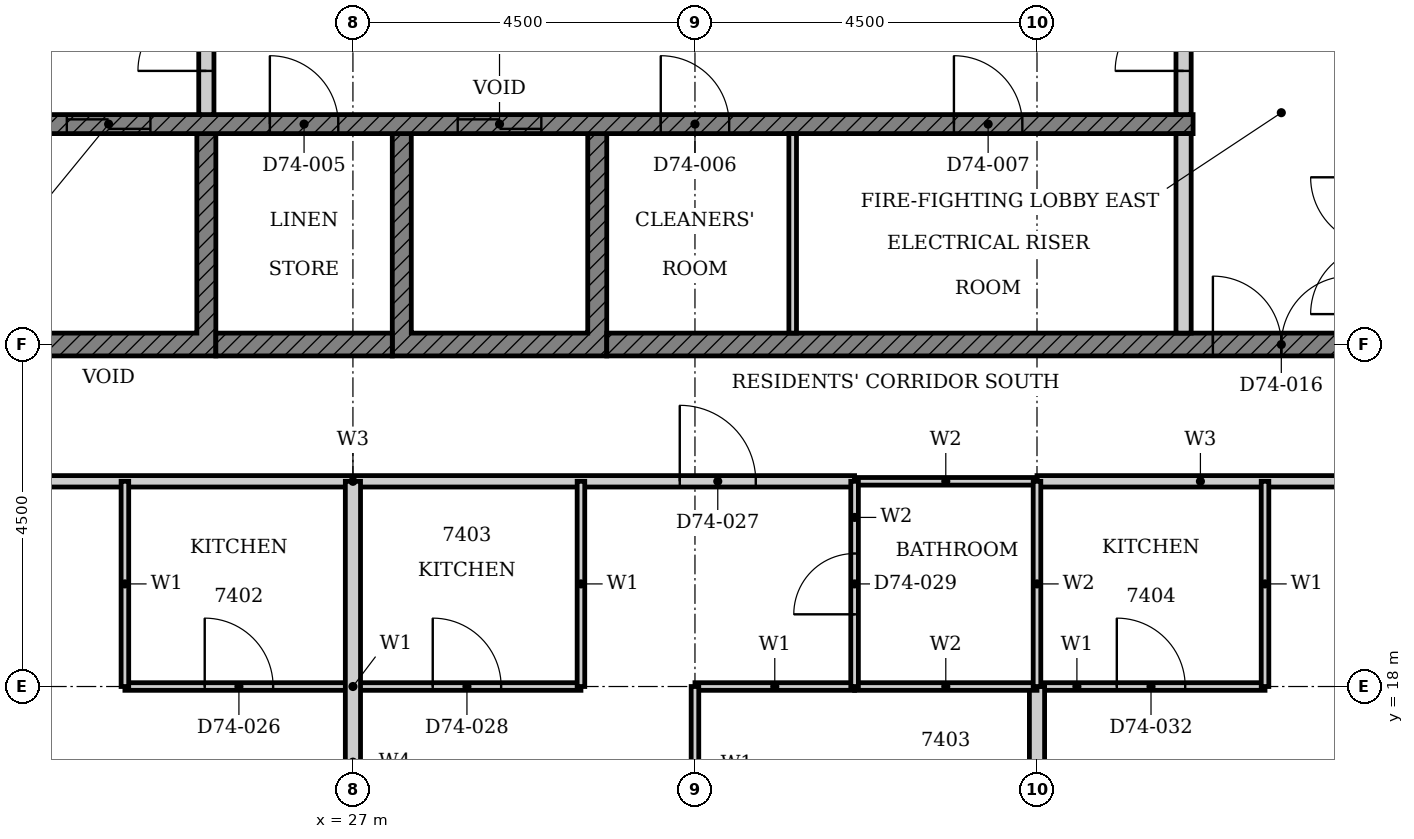
"""IFC4 building model, lengths in metres.
Left out: names, types, materials, properties, quantities, classifications, styles, units other than length and angle.
Written with IfcOpenShell. Run it as: python <this file> out.ifc"""

import sys

from ifc_helpers import new_model, si_unit, direction, frame, frame_2d, origin, place, context, subcontext, project, spatial, polyline, rectangle, outline, extrude, element, fill, save


model = new_model("IFC4")
c1 = context("Model", 3, precision=1e-05, world=origin(), true_north=direction((0.0, 1.0)))
c2 = subcontext(c1, "Body", "Model", "MODEL_VIEW")
j1 = project(units=[si_unit("LENGTHUNIT", "METRE"), si_unit("PLANEANGLEUNIT", "RADIAN")], contexts=[c1])
p1 = place(None, origin())
s1 = spatial("IfcSite", under=j1, at=p1, CompositionType="ELEMENT")
p2 = place(p1, origin())
s2 = spatial("IfcBuilding", under=s1, at=p2, CompositionType="ELEMENT")
p3 = place(p2, frame((0.0, 0.0, 290.8)))
s3 = spatial("IfcBuildingStorey", under=s2, at=p3, CompositionType="ELEMENT", Elevation=290.8)
p4 = place(p3, origin())
e1 = element("IfcWall", 1, at=p4, inside=s3, PredefinedType="SHEAR", context=c2, shape_type="SweptSolid", body=[
    extrude(outline(polyline([(22.375, 22.35), (25.197, 22.35), (25.197, 25.275), (24.947, 25.275), (24.947, 22.65), (22.625, 22.65), (22.625, 25.275), (22.375, 25.275), (22.375, 22.35)])), origin(), (0.0, 0.0, 1.0), 3.4),
])
p5 = place(p3, origin())
e2 = element("IfcWall", 2, at=p5, inside=s3, PredefinedType="SHEAR", context=c2, shape_type="SweptSolid", body=[
    extrude(outline(polyline([(27.518, 22.35), (30.339, 22.35), (30.339, 25.275), (30.089, 25.275), (30.089, 22.65), (27.768, 22.65), (27.768, 25.275), (27.518, 25.275), (27.518, 22.35)])), origin(), (0.0, 0.0, 1.0), 3.4),
])
p6 = place(p3, frame((25.197, 22.5, 0.0), z_axis=(0.0, 0.0, 1.0), x_axis=(1.0, 0.0, 0.0)))
e3 = element("IfcWall", 3, at=p6, inside=s3, PredefinedType="SHEAR", context=c2, shape_type="SweptSolid", body=[
    extrude(rectangle(XDim=2.321, YDim=0.3, at=frame_2d((1.161, 0.0))), origin(), (0.0, 0.0, 1.0), 3.4),
])
p7 = place(p3, frame((30.339, 22.5, 0.0), z_axis=(0.0, 0.0, 1.0), x_axis=(1.0, 0.0, 0.0)))
e4 = element("IfcWall", 4, at=p7, inside=s3, PredefinedType="SHEAR", context=c2, shape_type="SweptSolid", body=[
    extrude(rectangle(XDim=14.511, YDim=0.3, at=frame_2d((7.255, 0.0))), origin(), (0.0, 0.0, 1.0), 3.4),
])
p8 = place(p7, frame((7.975, 0.0, 0.0)))
e5 = element("IfcOpeningElement", 5, at=p8, cuts=e4, PredefinedType="OPENING", context=c2, shape_type="SweptSolid", body=[
    extrude(rectangle(XDim=1.8, YDim=2.1, at=frame_2d((0.9, 1.05))), frame((0.0, 0.16, 0.0), z_axis=(0.0, -1.0, 0.0), x_axis=(1.0, 0.0, 0.0)), (0.0, 0.0, 1.0), 0.32),
])
p9 = place(p3, frame((22.375, 25.4, 0.0), z_axis=(0.0, 0.0, 1.0), x_axis=(1.0, 0.0, 0.0)))
e6 = element("IfcWall", 6, at=p9, inside=s3, PredefinedType="SHEAR", context=c2, shape_type="SweptSolid", body=[
    extrude(rectangle(XDim=15.678, YDim=0.25, at=frame_2d((7.839, 0.0))), origin(), (0.0, 0.0, 1.0), 3.4),
])
p10 = place(p9, frame((6.004, 0.0, 0.0)))
e7 = element("IfcOpeningElement", 7, at=p10, cuts=e6, PredefinedType="OPENING", context=c2, shape_type="SweptSolid", body=[
    extrude(rectangle(XDim=1.1, YDim=2.1, at=frame_2d((0.55, 1.05))), frame((0.0, 0.135, 0.0), z_axis=(0.0, -1.0, 0.0), x_axis=(1.0, 0.0, 0.0)), (0.0, 0.0, 1.0), 0.27),
])
p11 = place(p9, frame((0.861, 0.0, 0.0)))
e8 = element("IfcOpeningElement", 8, at=p11, cuts=e6, PredefinedType="OPENING", context=c2, shape_type="SweptSolid", body=[
    extrude(rectangle(XDim=1.1, YDim=2.1, at=frame_2d((0.55, 1.05))), frame((0.0, 0.135, 0.0), z_axis=(0.0, -1.0, 0.0), x_axis=(1.0, 0.0, 0.0)), (0.0, 0.0, 1.0), 0.27),
])
p12 = place(p9, frame((3.532, 0.0, 0.0)))
e9 = element("IfcOpeningElement", 9, at=p12, cuts=e6, PredefinedType="OPENING", context=c2, shape_type="SweptSolid", body=[
    extrude(rectangle(XDim=0.9, YDim=2.1, at=frame_2d((0.45, 1.05))), frame((0.0, 0.135, 0.0), z_axis=(0.0, -1.0, 0.0), x_axis=(1.0, 0.0, 0.0)), (0.0, 0.0, 1.0), 0.27),
])
p13 = place(p9, frame((8.675, 0.0, 0.0)))
e10 = element("IfcOpeningElement", 10, at=p13, cuts=e6, PredefinedType="OPENING", context=c2, shape_type="SweptSolid", body=[
    extrude(rectangle(XDim=0.9, YDim=2.1, at=frame_2d((0.45, 1.05))), frame((0.0, 0.135, 0.0), z_axis=(0.0, -1.0, 0.0), x_axis=(1.0, 0.0, 0.0)), (0.0, 0.0, 1.0), 0.27),
])
p14 = place(p9, frame((12.532, 0.0, 0.0)))
e11 = element("IfcOpeningElement", 11, at=p14, cuts=e6, PredefinedType="OPENING", context=c2, shape_type="SweptSolid", body=[
    extrude(rectangle(XDim=0.9, YDim=2.1, at=frame_2d((0.45, 1.05))), frame((0.0, 0.135, 0.0), z_axis=(0.0, -1.0, 0.0), x_axis=(1.0, 0.0, 0.0)), (0.0, 0.0, 1.0), 0.27),
])
p15 = place(p3, frame((37.928, 22.65, 0.0), z_axis=(0.0, 0.0, 1.0), x_axis=(0.0, 1.0, 0.0)))
e12 = element("IfcWall", 12, at=p15, inside=s3, PredefinedType="PARTITIONING", context=c2, shape_type="SweptSolid", body=[
    extrude(rectangle(XDim=2.625, YDim=0.2, at=frame_2d((1.312, 0.0))), origin(), (0.0, 0.0, 1.0), 3.4),
])
p16 = place(p3, frame((32.786, 22.65, 0.0), z_axis=(0.0, 0.0, 1.0), x_axis=(0.0, 1.0, 0.0)))
e13 = element("IfcWall", 13, at=p16, inside=s3, PredefinedType="PARTITIONING", context=c2, shape_type="SweptSolid", body=[
    extrude(rectangle(XDim=2.625, YDim=0.1, at=frame_2d((1.312, 0.0))), origin(), (0.0, 0.0, 1.0), 3.4),
])
p17 = place(p3, frame((25.072, 25.525, 0.0), z_axis=(0.0, 0.0, 1.0), x_axis=(0.0, 1.0, 0.0)))
e14 = element("IfcWall", 14, at=p17, inside=s3, PredefinedType="PARTITIONING", context=c2, shape_type="SweptSolid", body=[
    extrude(rectangle(XDim=2.95, YDim=0.2, at=frame_2d((1.475, 0.0))), origin(), (0.0, 0.0, 1.0), 3.4),
])
p18 = place(p17, frame((0.575, 0.0, 0.0)))
e15 = element("IfcOpeningElement", 15, at=p18, cuts=e14, PredefinedType="OPENING", context=c2, shape_type="SweptSolid", body=[
    extrude(rectangle(XDim=1.8, YDim=2.1, at=frame_2d((0.9, 1.05))), frame((0.0, 0.11, 0.0), z_axis=(0.0, -1.0, 0.0), x_axis=(1.0, 0.0, 0.0)), (0.0, 0.0, 1.0), 0.22),
])
p19 = place(p3, frame((37.928, 25.525, 0.0), z_axis=(0.0, 0.0, 1.0), x_axis=(0.0, 1.0, 0.0)))
e16 = element("IfcWall", 16, at=p19, inside=s3, PredefinedType="PARTITIONING", context=c2, shape_type="SweptSolid", body=[
    extrude(rectangle(XDim=2.95, YDim=0.2, at=frame_2d((1.475, 0.0))), origin(), (0.0, 0.0, 1.0), 3.4),
])
p20 = place(p19, frame((0.575, 0.0, 0.0)))
e17 = element("IfcOpeningElement", 17, at=p20, cuts=e16, PredefinedType="OPENING", context=c2, shape_type="SweptSolid", body=[
    extrude(rectangle(XDim=1.8, YDim=2.1, at=frame_2d((0.9, 1.05))), frame((0.0, 0.11, 0.0), z_axis=(0.0, -1.0, 0.0), x_axis=(1.0, 0.0, 0.0)), (0.0, 0.0, 1.0), 0.22),
])
p21 = place(p3, frame((20.4, 20.7, 0.0), z_axis=(0.0, 0.0, 1.0), x_axis=(1.0, 0.0, 0.0)))
e18 = element("IfcWall", 18, at=p21, inside=s3, PredefinedType="PARTITIONING", context=c2, shape_type="SweptSolid", body=[
    extrude(rectangle(XDim=13.2, YDim=0.15, at=frame_2d((6.6, 0.0))), origin(), (0.0, 0.0, 1.0), 3.4),
])
p22 = place(p21, frame((1.3, 0.0, 0.0)))
e19 = element("IfcOpeningElement", 19, at=p22, cuts=e18, PredefinedType="OPENING", context=c2, shape_type="SweptSolid", body=[
    extrude(rectangle(XDim=1.0, YDim=2.2, at=frame_2d((0.5, 1.1))), frame((0.0, 0.085, 0.0), z_axis=(0.0, -1.0, 0.0), x_axis=(1.0, 0.0, 0.0)), (0.0, 0.0, 1.0), 0.17),
])
p23 = place(p21, frame((10.9, 0.0, 0.0)))
e20 = element("IfcOpeningElement", 20, at=p23, cuts=e18, PredefinedType="OPENING", context=c2, shape_type="SweptSolid", body=[
    extrude(rectangle(XDim=1.0, YDim=2.2, at=frame_2d((0.5, 1.1))), frame((0.0, 0.085, 0.0), z_axis=(0.0, -1.0, 0.0), x_axis=(1.0, 0.0, 0.0)), (0.0, 0.0, 1.0), 0.17),
])
p24 = place(p3, frame((36.0, 20.7, 0.0), z_axis=(0.0, 0.0, 1.0), x_axis=(1.0, 0.0, 0.0)))
e21 = element("IfcWall", 21, at=p24, inside=s3, PredefinedType="PARTITIONING", context=c2, shape_type="SweptSolid", body=[
    extrude(rectangle(XDim=6.6, YDim=0.15, at=frame_2d((3.3, 0.0))), origin(), (0.0, 0.0, 1.0), 3.4),
])
p25 = place(p24, frame((4.3, 0.0, 0.0)))
e22 = element("IfcOpeningElement", 22, at=p25, cuts=e21, PredefinedType="OPENING", context=c2, shape_type="SweptSolid", body=[
    extrude(rectangle(XDim=1.0, YDim=2.2, at=frame_2d((0.5, 1.1))), frame((0.0, 0.085, 0.0), z_axis=(0.0, -1.0, 0.0), x_axis=(1.0, 0.0, 0.0)), (0.0, 0.0, 1.0), 0.17),
])
p26 = place(p3, frame((24.0, 18.0, 0.0), z_axis=(0.0, 0.0, 1.0), x_axis=(1.0, 0.0, 0.0)))
e23 = element("IfcWall", 23, at=p26, inside=s3, PredefinedType="PARTITIONING", context=c2, shape_type="SweptSolid", body=[
    extrude(rectangle(XDim=6.0, YDim=0.1, at=frame_2d((3.0, 0.0))), origin(), (0.0, 0.0, 1.0), 3.4),
])
p27 = place(p26, frame((1.05, 0.0, 0.0)))
e24 = element("IfcOpeningElement", 24, at=p27, cuts=e23, PredefinedType="OPENING", context=c2, shape_type="SweptSolid", body=[
    extrude(rectangle(XDim=0.9, YDim=2.1, at=frame_2d((0.45, 1.05))), frame((0.0, 0.06, 0.0), z_axis=(0.0, -1.0, 0.0), x_axis=(1.0, 0.0, 0.0)), (0.0, 0.0, 1.0), 0.12),
])
p28 = place(p26, frame((4.05, 0.0, 0.0)))
e25 = element("IfcOpeningElement", 25, at=p28, cuts=e23, PredefinedType="OPENING", context=c2, shape_type="SweptSolid", body=[
    extrude(rectangle(XDim=0.9, YDim=2.1, at=frame_2d((0.45, 1.05))), frame((0.0, 0.06, 0.0), z_axis=(0.0, -1.0, 0.0), x_axis=(1.0, 0.0, 0.0)), (0.0, 0.0, 1.0), 0.12),
])
p29 = place(p3, frame((31.5, 18.0, 0.0), z_axis=(0.0, 0.0, 1.0), x_axis=(1.0, 0.0, 0.0)))
e26 = element("IfcWall", 26, at=p29, inside=s3, PredefinedType="PARTITIONING", context=c2, shape_type="SweptSolid", body=[
    extrude(rectangle(XDim=2.1, YDim=0.1, at=frame_2d((1.05, 0.0))), origin(), (0.0, 0.0, 1.0), 3.4),
])
p30 = place(p3, frame((36.0, 18.0, 0.0), z_axis=(0.0, 0.0, 1.0), x_axis=(1.0, 0.0, 0.0)))
e27 = element("IfcWall", 27, at=p30, inside=s3, PredefinedType="PARTITIONING", context=c2, shape_type="SweptSolid", body=[
    extrude(rectangle(XDim=3.0, YDim=0.1, at=frame_2d((1.5, 0.0))), origin(), (0.0, 0.0, 1.0), 3.4),
])
p31 = place(p30, frame((1.05, 0.0, 0.0)))
e28 = element("IfcOpeningElement", 28, at=p31, cuts=e27, PredefinedType="OPENING", context=c2, shape_type="SweptSolid", body=[
    extrude(rectangle(XDim=0.9, YDim=2.1, at=frame_2d((0.45, 1.05))), frame((0.0, 0.06, 0.0), z_axis=(0.0, -1.0, 0.0), x_axis=(1.0, 0.0, 0.0)), (0.0, 0.0, 1.0), 0.12),
])
for number, where, z_axis, x_axis in (
    (29, (24.0, 18.0, 0.0), (0.0, 0.0, 1.0), (0.0, 1.0, 0.0)),
    (30, (30.0, 18.0, 0.0), (0.0, 0.0, 1.0), (0.0, 1.0, 0.0)),
):
    element("IfcWall", number, at=place(p3, frame(where, z_axis=z_axis, x_axis=x_axis)), inside=s3, PredefinedType="PARTITIONING", context=c2, shape_type="SweptSolid", body=[
        extrude(rectangle(XDim=2.7, YDim=0.1, at=frame_2d((1.35, 0.0))), origin(), (0.0, 0.0, 1.0), 3.4),
    ])
p32 = place(p3, frame((31.5, 13.26, 0.0), z_axis=(0.0, 0.0, 1.0), x_axis=(0.0, 1.0, 0.0)))
e31 = element("IfcWall", 31, at=p32, inside=s3, PredefinedType="PARTITIONING", context=c2, shape_type="SweptSolid", body=[
    extrude(rectangle(XDim=4.74, YDim=0.1, at=frame_2d((2.37, 0.0))), origin(), (0.0, 0.0, 1.0), 3.4),
])
p33 = place(p32, frame((1.8, 0.0, 0.0)))
e32 = element("IfcOpeningElement", 32, at=p33, cuts=e31, PredefinedType="OPENING", context=c2, shape_type="SweptSolid", body=[
    extrude(rectangle(XDim=0.9, YDim=2.1, at=frame_2d((0.45, 1.05))), frame((0.0, 0.06, 0.0), z_axis=(0.0, -1.0, 0.0), x_axis=(1.0, 0.0, 0.0)), (0.0, 0.0, 1.0), 0.12),
])
p34 = place(p3, frame((39.0, 18.0, 0.0), z_axis=(0.0, 0.0, 1.0), x_axis=(0.0, 1.0, 0.0)))
e33 = element("IfcWall", 33, at=p34, inside=s3, PredefinedType="PARTITIONING", context=c2, shape_type="SweptSolid", body=[
    extrude(rectangle(XDim=2.7, YDim=0.1, at=frame_2d((1.35, 0.0))), origin(), (0.0, 0.0, 1.0), 3.4),
])
p35 = place(p3, frame((27.0, 13.31, 0.0), z_axis=(0.0, 0.0, 1.0), x_axis=(0.0, 1.0, 0.0)))
e34 = element("IfcWall", 34, at=p35, inside=s3, PredefinedType="PARTITIONING", context=c2, shape_type="SweptSolid", body=[
    extrude(rectangle(XDim=7.39, YDim=0.2, at=frame_2d((3.695, 0.0))), origin(), (0.0, 0.0, 1.0), 3.4),
])
p36 = place(p3, frame((36.0, 13.31, 0.0), z_axis=(0.0, 0.0, 1.0), x_axis=(0.0, 1.0, 0.0)))
e35 = element("IfcWall", 35, at=p36, inside=s3, PredefinedType="PARTITIONING", context=c2, shape_type="SweptSolid", body=[
    extrude(rectangle(XDim=4.69, YDim=0.2, at=frame_2d((2.345, 0.0))), origin(), (0.0, 0.0, 1.0), 3.4),
])
for number, where, z_axis, x_axis in (
    (36, (33.6, 18.0, 0.0), (0.0, 0.0, 1.0), (1.0, 0.0, 0.0)),
    (37, (33.6, 20.7, 0.0), (0.0, 0.0, 1.0), (1.0, 0.0, 0.0)),
):
    element("IfcWall", number, at=place(p3, frame(where, z_axis=z_axis, x_axis=x_axis)), inside=s3, PredefinedType="PARTITIONING", context=c2, shape_type="SweptSolid", body=[
        extrude(rectangle(XDim=2.4, YDim=0.1, at=frame_2d((1.2, 0.0))), origin(), (0.0, 0.0, 1.0), 3.4),
    ])
p37 = place(p3, frame((33.6, 18.0, 0.0), z_axis=(0.0, 0.0, 1.0), x_axis=(0.0, 1.0, 0.0)))
e38 = element("IfcWall", 38, at=p37, inside=s3, PredefinedType="PARTITIONING", context=c2, shape_type="SweptSolid", body=[
    extrude(rectangle(XDim=2.7, YDim=0.1, at=frame_2d((1.35, 0.0))), origin(), (0.0, 0.0, 1.0), 3.4),
])
p38 = place(p37, frame((0.95, 0.0, 0.0)))
e39 = element("IfcOpeningElement", 39, at=p38, cuts=e38, PredefinedType="OPENING", context=c2, shape_type="SweptSolid", body=[
    extrude(rectangle(XDim=0.8, YDim=2.1, at=frame_2d((0.4, 1.05))), frame((0.0, 0.06, 0.0), z_axis=(0.0, -1.0, 0.0), x_axis=(1.0, 0.0, 0.0)), (0.0, 0.0, 1.0), 0.12),
])
p39 = place(p3, frame((36.0, 18.0, 0.0), z_axis=(0.0, 0.0, 1.0), x_axis=(0.0, 1.0, 0.0)))
e40 = element("IfcWall", 40, at=p39, inside=s3, PredefinedType="PARTITIONING", context=c2, shape_type="SweptSolid", body=[
    extrude(rectangle(XDim=2.7, YDim=0.1, at=frame_2d((1.35, 0.0))), origin(), (0.0, 0.0, 1.0), 3.4),
])
p40 = place(p10, origin())
e41 = element("IfcDoor", 41, at=p40, inside=s3, OperationType="DOUBLE_DOOR_SLIDING", PredefinedType="DOOR", context=c2, shape_type="SweptSolid", body=[
    extrude(rectangle(XDim=1.1, YDim=2.1, at=frame_2d((0.55, 1.05))), frame((0.0, 0.025, 0.0), z_axis=(0.0, -1.0, 0.0), x_axis=(1.0, 0.0, 0.0)), (0.0, 0.0, 1.0), 0.05),
])
fill(e7, e41)
p41 = place(p11, origin())
e42 = element("IfcDoor", 42, at=p41, inside=s3, OperationType="DOUBLE_DOOR_SLIDING", PredefinedType="DOOR", context=c2, shape_type="SweptSolid", body=[
    extrude(rectangle(XDim=1.1, YDim=2.1, at=frame_2d((0.55, 1.05))), frame((0.0, 0.025, 0.0), z_axis=(0.0, -1.0, 0.0), x_axis=(1.0, 0.0, 0.0)), (0.0, 0.0, 1.0), 0.05),
])
fill(e8, e42)
p42 = place(p12, origin())
e43 = element("IfcDoor", 43, at=p42, inside=s3, OperationType="SINGLE_SWING_LEFT", PredefinedType="DOOR", context=c2, shape_type="SweptSolid", body=[
    extrude(rectangle(XDim=0.9, YDim=2.1, at=frame_2d((0.45, 1.05))), frame((0.0, 0.025, 0.0), z_axis=(0.0, -1.0, 0.0), x_axis=(1.0, 0.0, 0.0)), (0.0, 0.0, 1.0), 0.05),
])
fill(e9, e43)
p43 = place(p13, origin())
e44 = element("IfcDoor", 44, at=p43, inside=s3, OperationType="SINGLE_SWING_LEFT", PredefinedType="DOOR", context=c2, shape_type="SweptSolid", body=[
    extrude(rectangle(XDim=0.9, YDim=2.1, at=frame_2d((0.45, 1.05))), frame((0.0, 0.025, 0.0), z_axis=(0.0, -1.0, 0.0), x_axis=(1.0, 0.0, 0.0)), (0.0, 0.0, 1.0), 0.05),
])
fill(e10, e44)
p44 = place(p14, origin())
e45 = element("IfcDoor", 45, at=p44, inside=s3, OperationType="SINGLE_SWING_LEFT", PredefinedType="DOOR", context=c2, shape_type="SweptSolid", body=[
    extrude(rectangle(XDim=0.9, YDim=2.1, at=frame_2d((0.45, 1.05))), frame((0.0, 0.025, 0.0), z_axis=(0.0, -1.0, 0.0), x_axis=(1.0, 0.0, 0.0)), (0.0, 0.0, 1.0), 0.05),
])
fill(e11, e45)
p45 = place(p18, origin())
e46 = element("IfcDoor", 46, at=p45, inside=s3, OperationType="DOUBLE_DOOR_SINGLE_SWING", PredefinedType="DOOR", context=c2, shape_type="SweptSolid", body=[
    extrude(rectangle(XDim=1.8, YDim=2.1, at=frame_2d((0.9, 1.05))), frame((0.0, 0.025, 0.0), z_axis=(0.0, -1.0, 0.0), x_axis=(1.0, 0.0, 0.0)), (0.0, 0.0, 1.0), 0.05),
])
fill(e15, e46)
p46 = place(p20, origin())
e47 = element("IfcDoor", 47, at=p46, inside=s3, OperationType="DOUBLE_DOOR_SINGLE_SWING", PredefinedType="DOOR", context=c2, shape_type="SweptSolid", body=[
    extrude(rectangle(XDim=1.8, YDim=2.1, at=frame_2d((0.9, 1.05))), frame((0.0, 0.025, 0.0), z_axis=(0.0, -1.0, 0.0), x_axis=(1.0, 0.0, 0.0)), (0.0, 0.0, 1.0), 0.05),
])
fill(e17, e47)
p47 = place(p8, origin())
e48 = element("IfcDoor", 48, at=p47, inside=s3, OperationType="DOUBLE_DOOR_SINGLE_SWING", PredefinedType="DOOR", context=c2, shape_type="SweptSolid", body=[
    extrude(rectangle(XDim=1.8, YDim=2.1, at=frame_2d((0.9, 1.05))), frame((0.0, 0.025, 0.0), z_axis=(0.0, -1.0, 0.0), x_axis=(1.0, 0.0, 0.0)), (0.0, 0.0, 1.0), 0.05),
])
fill(e5, e48)
p48 = place(p27, origin())
e49 = element("IfcDoor", 49, at=p48, inside=s3, OperationType="SINGLE_SWING_RIGHT", PredefinedType="DOOR", context=c2, shape_type="SweptSolid", body=[
    extrude(rectangle(XDim=0.9, YDim=2.1, at=frame_2d((0.45, 1.05))), frame((0.0, 0.025, 0.0), z_axis=(0.0, -1.0, 0.0), x_axis=(1.0, 0.0, 0.0)), (0.0, 0.0, 1.0), 0.05),
])
fill(e24, e49)
p49 = place(p23, origin())
e50 = element("IfcDoor", 50, at=p49, inside=s3, OperationType="SINGLE_SWING_LEFT", PredefinedType="DOOR", context=c2, shape_type="SweptSolid", body=[
    extrude(rectangle(XDim=1.0, YDim=2.2, at=frame_2d((0.5, 1.1))), frame((0.0, 0.025, 0.0), z_axis=(0.0, -1.0, 0.0), x_axis=(1.0, 0.0, 0.0)), (0.0, 0.0, 1.0), 0.05),
])
fill(e20, e50)
p50 = place(p28, origin())
e51 = element("IfcDoor", 51, at=p50, inside=s3, OperationType="SINGLE_SWING_LEFT", PredefinedType="DOOR", context=c2, shape_type="SweptSolid", body=[
    extrude(rectangle(XDim=0.9, YDim=2.1, at=frame_2d((0.45, 1.05))), frame((0.0, 0.025, 0.0), z_axis=(0.0, -1.0, 0.0), x_axis=(1.0, 0.0, 0.0)), (0.0, 0.0, 1.0), 0.05),
])
fill(e25, e51)
p51 = place(p38, origin())
e52 = element("IfcDoor", 52, at=p51, inside=s3, OperationType="SINGLE_SWING_LEFT", PredefinedType="DOOR", context=c2, shape_type="SweptSolid", body=[
    extrude(rectangle(XDim=0.8, YDim=2.1, at=frame_2d((0.4, 1.05))), frame((0.0, 0.025, 0.0), z_axis=(0.0, -1.0, 0.0), x_axis=(1.0, 0.0, 0.0)), (0.0, 0.0, 1.0), 0.05),
])
fill(e39, e52)
p52 = place(p31, origin())
e53 = element("IfcDoor", 53, at=p52, inside=s3, OperationType="SINGLE_SWING_RIGHT", PredefinedType="DOOR", context=c2, shape_type="SweptSolid", body=[
    extrude(rectangle(XDim=0.9, YDim=2.1, at=frame_2d((0.45, 1.05))), frame((0.0, 0.025, 0.0), z_axis=(0.0, -1.0, 0.0), x_axis=(1.0, 0.0, 0.0)), (0.0, 0.0, 1.0), 0.05),
])
fill(e28, e53)
save(model, sys.argv[1])
